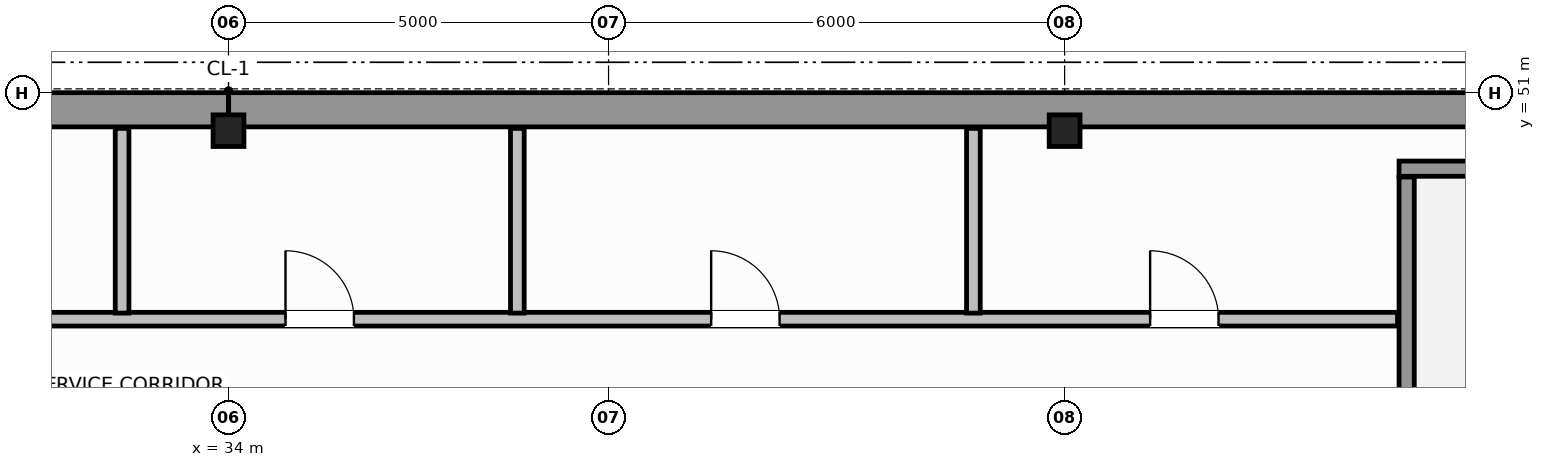
"""IFC4 building model, lengths in metres.
Left out: names, types, materials, properties, quantities, classifications, styles, units other than length and angle.
Written with IfcOpenShell. Run it as: python <this file> out.ifc"""

import sys

from ifc_helpers import new_model, si_unit, direction, frame, frame_2d, origin, origin_2d, place, context, subcontext, project, spatial, rectangle, i_section, extrude, source, transform, mapped, element, fill, save


model = new_model("IFC4")
c1 = context("Model", 3, precision=1e-05, world=origin(), true_north=direction((0.0, 1.0)))
c2 = subcontext(c1, "Body", "Model", "MODEL_VIEW")
j1 = project(units=[si_unit("LENGTHUNIT", "METRE"), si_unit("PLANEANGLEUNIT", "RADIAN")], contexts=[c1])
p1 = place(None, origin())
s1 = spatial("IfcSite", under=j1, at=p1, CompositionType="ELEMENT")
p2 = place(p1, origin())
s2 = spatial("IfcBuilding", under=s1, at=p2, CompositionType="ELEMENT")
p3 = place(p2, frame((0.0, 0.0, 280.2)))
s3 = spatial("IfcBuildingStorey", under=s2, at=p3, CompositionType="ELEMENT", Elevation=280.2)
m1 = source(origin(), c2, "Body", "SweptSolid", [
    extrude(i_section(OverallWidth=0.406, OverallDepth=0.416, WebThickness=0.03, FlangeThickness=0.042, FilletRadius=0.015, at=origin_2d()), origin(), (0.0, 0.0, 1.0), 3.8),
])
for number, where, z_axis, x_axis in (
    (1, (34.0, 50.5, 0.0), (0.0, 0.0, 1.0), (1.0, 0.0, 0.0)),
    (2, (45.0, 50.5, 0.0), (0.0, 0.0, 1.0), (1.0, 0.0, 0.0)),
):
    element("IfcColumn", number, at=place(p3, frame(where, z_axis=z_axis, x_axis=x_axis)), inside=s3, PredefinedType="COLUMN", context=c2, shape_type="MappedRepresentation", body=[
        mapped(m1, transform((0.0, 0.0, 0.0), scale=1.0)),
    ])
for number, where, z_axis, x_axis in (
    (3, (14.229, 50.775, 0.0), (0.0, 0.0, 1.0), (1.0, 0.0, 0.0)),
    (4, (34.002, 50.775, 0.0), (0.0, 0.0, 1.0), (1.0, 0.0, 0.0)),
):
    element("IfcWall", number, at=place(p3, frame(where, z_axis=z_axis, x_axis=x_axis)), inside=s3, PredefinedType="SHEAR", context=c2, shape_type="SweptSolid", body=[
        extrude(rectangle(XDim=19.769, YDim=0.45, at=frame_2d((9.885, 0.0))), origin(), (0.0, 0.0, 1.0), 3.8),
    ])
p4 = place(p3, frame((49.4, 50.0, 0.0), z_axis=(0.0, 0.0, 1.0), x_axis=(1.0, 0.0, 0.0)))
e5 = element("IfcWall", 5, at=p4, inside=s3, PredefinedType="SOLIDWALL", context=c2, shape_type="SweptSolid", body=[
    extrude(rectangle(XDim=4.375, YDim=0.2, at=frame_2d((2.188, 0.0))), origin(), (0.0, 0.0, 1.0), 3.8),
])
p5 = place(p3, frame((49.5, 39.96, 0.0), z_axis=(0.0, 0.0, 1.0), x_axis=(0.0, 1.0, 0.0)))
e6 = element("IfcWall", 6, at=p5, inside=s3, PredefinedType="SOLIDWALL", context=c2, shape_type="SweptSolid", body=[
    extrude(rectangle(XDim=9.93, YDim=0.2, at=frame_2d((4.965, 0.0))), origin(), (0.0, 0.0, 1.0), 3.8),
])
p6 = place(p3, frame((18.62, 48.02, 0.0), z_axis=(0.0, 0.0, 1.0), x_axis=(1.0, 0.0, 0.0)))
e7 = element("IfcWall", 7, at=p6, inside=s3, PredefinedType="PLUMBINGWALL", context=c2, shape_type="SweptSolid", body=[
    extrude(rectangle(XDim=30.76, YDim=0.18, at=frame_2d((15.38, 0.0))), origin(), (0.0, 0.0, 1.0), 3.58),
])
p7 = place(p6, frame((1.655, 0.0, 0.0)))
e8 = element("IfcOpeningElement", 8, at=p7, cuts=e7, PredefinedType="OPENING", context=c2, shape_type="SweptSolid", body=[
    extrude(rectangle(XDim=0.9, YDim=2.15, at=frame_2d((0.45, 1.075))), frame((0.0, 0.1, 0.0), z_axis=(0.0, -1.0, 0.0), x_axis=(1.0, 0.0, 0.0)), (0.0, 0.0, 1.0), 0.2),
])
p8 = place(p6, frame((6.03, 0.0, 0.0)))
e9 = element("IfcOpeningElement", 9, at=p8, cuts=e7, PredefinedType="OPENING", context=c2, shape_type="SweptSolid", body=[
    extrude(rectangle(XDim=0.9, YDim=2.15, at=frame_2d((0.45, 1.075))), frame((0.0, 0.1, 0.0), z_axis=(0.0, -1.0, 0.0), x_axis=(1.0, 0.0, 0.0)), (0.0, 0.0, 1.0), 0.2),
])
p9 = place(p6, frame((10.93, 0.0, 0.0)))
e10 = element("IfcOpeningElement", 10, at=p9, cuts=e7, PredefinedType="OPENING", context=c2, shape_type="SweptSolid", body=[
    extrude(rectangle(XDim=0.9, YDim=2.15, at=frame_2d((0.45, 1.075))), frame((0.0, 0.1, 0.0), z_axis=(0.0, -1.0, 0.0), x_axis=(1.0, 0.0, 0.0)), (0.0, 0.0, 1.0), 0.2),
])
p10 = place(p6, frame((16.13, 0.0, 0.0)))
e11 = element("IfcOpeningElement", 11, at=p10, cuts=e7, PredefinedType="OPENING", context=c2, shape_type="SweptSolid", body=[
    extrude(rectangle(XDim=0.9, YDim=2.15, at=frame_2d((0.45, 1.075))), frame((0.0, 0.1, 0.0), z_axis=(0.0, -1.0, 0.0), x_axis=(1.0, 0.0, 0.0)), (0.0, 0.0, 1.0), 0.2),
])
p11 = place(p6, frame((21.73, 0.0, 0.0)))
e12 = element("IfcOpeningElement", 12, at=p11, cuts=e7, PredefinedType="OPENING", context=c2, shape_type="SweptSolid", body=[
    extrude(rectangle(XDim=0.9, YDim=2.15, at=frame_2d((0.45, 1.075))), frame((0.0, 0.1, 0.0), z_axis=(0.0, -1.0, 0.0), x_axis=(1.0, 0.0, 0.0)), (0.0, 0.0, 1.0), 0.2),
])
p12 = place(p6, frame((27.505, 0.0, 0.0)))
e13 = element("IfcOpeningElement", 13, at=p12, cuts=e7, PredefinedType="OPENING", context=c2, shape_type="SweptSolid", body=[
    extrude(rectangle(XDim=0.9, YDim=2.15, at=frame_2d((0.45, 1.075))), frame((0.0, 0.1, 0.0), z_axis=(0.0, -1.0, 0.0), x_axis=(1.0, 0.0, 0.0)), (0.0, 0.0, 1.0), 0.2),
])
for number, where, z_axis, x_axis in (
    (14, (32.6, 48.1, 0.0), (0.0, 0.0, 1.0), (0.0, 1.0, 0.0)),
    (15, (37.8, 48.1, 0.0), (0.0, 0.0, 1.0), (0.0, 1.0, 0.0)),
    (16, (43.8, 48.1, 0.0), (0.0, 0.0, 1.0), (0.0, 1.0, 0.0)),
):
    element("IfcWall", number, at=place(p3, frame(where, z_axis=z_axis, x_axis=x_axis)), inside=s3, PredefinedType="PLUMBINGWALL", context=c2, shape_type="SweptSolid", body=[
        extrude(rectangle(XDim=2.43, YDim=0.18, at=frame_2d((1.215, 0.0))), origin(), (0.0, 0.0, 1.0), 3.58),
    ])
m2 = source(origin(), c2, "Body", "SweptSolid", [
    extrude(rectangle(XDim=0.9, YDim=2.15, at=frame_2d((0.45, 1.075))), frame((0.0, 0.025, 0.0), z_axis=(0.0, -1.0, 0.0), x_axis=(1.0, 0.0, 0.0)), (0.0, 0.0, 1.0), 0.05),
])
p13 = place(p10, origin())
e17 = element("IfcDoor", 17, at=p13, inside=s3, OperationType="SINGLE_SWING_RIGHT", PredefinedType="DOOR", context=c2, shape_type="MappedRepresentation", body=[
    mapped(m2, transform((0.0, 0.0, 0.0), scale=1.0)),
])
fill(e11, e17)
p14 = place(p11, origin())
e18 = element("IfcDoor", 18, at=p14, inside=s3, OperationType="SINGLE_SWING_LEFT", PredefinedType="DOOR", context=c2, shape_type="MappedRepresentation", body=[
    mapped(m2, transform((0.0, 0.0, 0.0), scale=1.0)),
])
fill(e12, e18)
p15 = place(p12, origin())
e19 = element("IfcDoor", 19, at=p15, inside=s3, OperationType="SINGLE_SWING_RIGHT", PredefinedType="DOOR", context=c2, shape_type="MappedRepresentation", body=[
    mapped(m2, transform((0.0, 0.0, 0.0), scale=1.0)),
])
fill(e13, e19)
save(model, sys.argv[1])
